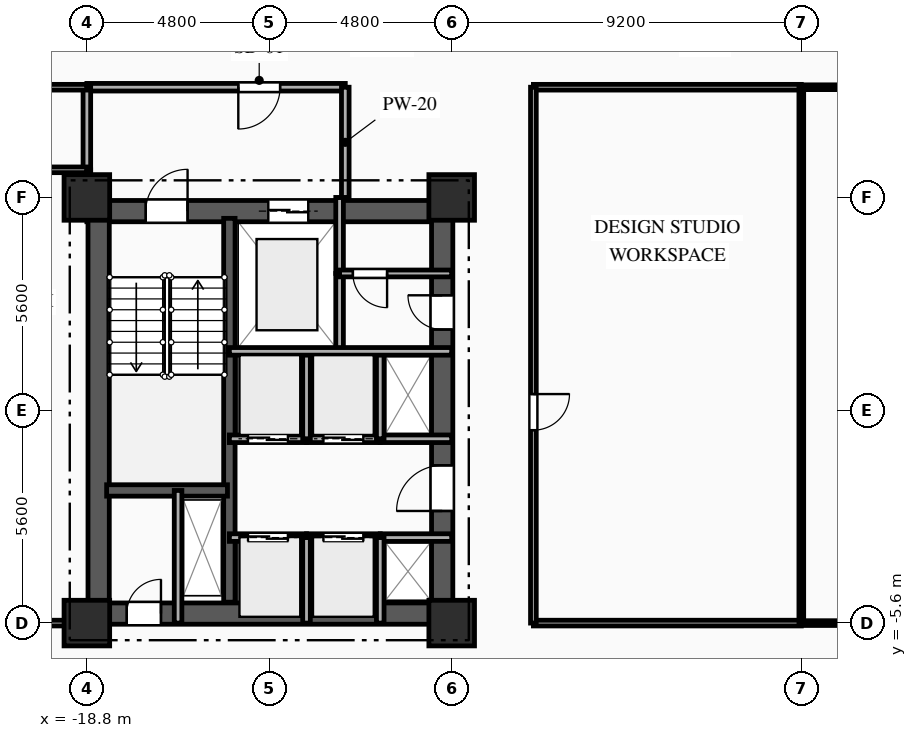
"""IFC4 building model, lengths in metres.
Left out: names, types, materials, properties, quantities, classifications, styles, units other than length and angle.
Written with IfcOpenShell. Run it as: python <this file> out.ifc"""

import sys

from ifc_helpers import new_model, si_unit, direction, frame, frame_2d, origin, origin_2d, place, context, subcontext, project, spatial, rectangle, extrude, element, fill, save


model = new_model("IFC4")
c1 = context("Model", 3, precision=1e-05, world=origin(), true_north=direction((0.0, 1.0)))
c2 = subcontext(c1, "Body", "Model", "MODEL_VIEW")
j1 = project(units=[si_unit("LENGTHUNIT", "METRE"), si_unit("PLANEANGLEUNIT", "RADIAN")], contexts=[c1])
p1 = place(None, origin())
s1 = spatial("IfcSite", under=j1, at=p1, CompositionType="ELEMENT")
p2 = place(p1, origin())
s2 = spatial("IfcBuilding", under=s1, at=p2, CompositionType="ELEMENT")
p3 = place(p2, frame((0.0, 0.0, 63.85)))
s3 = spatial("IfcBuildingStorey", under=s2, at=p3, CompositionType="ELEMENT", Elevation=63.85)
for number, where, z_axis, x_axis in (
    (1, (-18.8, -5.6, 0.0), (0.0, 0.0, 1.0), (1.0, 0.0, 0.0)),
    (2, (-18.8, 5.6, 0.0), (0.0, 0.0, 1.0), (1.0, 0.0, 0.0)),
    (3, (-9.2, -5.6, 0.0), (0.0, 0.0, 1.0), (1.0, 0.0, 0.0)),
    (4, (-9.2, 5.6, 0.0), (0.0, 0.0, 1.0), (1.0, 0.0, 0.0)),
):
    element("IfcColumn", number, at=place(p3, frame(where, z_axis=z_axis, x_axis=x_axis)), inside=s3, PredefinedType="COLUMN", context=c2, shape_type="SweptSolid", body=[
        extrude(rectangle(XDim=1.2, YDim=1.2, at=origin_2d()), origin(), (0.0, 0.0, 1.0), 3.35),
    ])
p4 = place(p3, frame((-18.8, 5.24, 0.0), z_axis=(0.0, 0.0, 1.0), x_axis=(1.0, 0.0, 0.0)))
e5 = element("IfcWall", 5, at=p4, inside=s3, PredefinedType="SHEAR", context=c2, shape_type="SweptSolid", body=[
    extrude(rectangle(XDim=9.6, YDim=0.56, at=frame_2d((4.8, 0.0))), origin(), (0.0, 0.0, 1.0), 3.035),
])
p5 = place(p4, frame((1.55, 0.0, 0.0)))
e6 = element("IfcOpeningElement", 6, at=p5, cuts=e5, PredefinedType="OPENING", context=c2, shape_type="SweptSolid", body=[
    extrude(rectangle(XDim=1.1, YDim=2.15, at=frame_2d((0.55, 1.075))), frame((0.0, 0.29, 0.0), z_axis=(0.0, -1.0, 0.0), x_axis=(1.0, 0.0, 0.0)), (0.0, 0.0, 1.0), 0.58),
])
p6 = place(p4, frame((4.775, 0.0, 0.0)))
e7 = element("IfcOpeningElement", 7, at=p6, cuts=e5, PredefinedType="OPENING", context=c2, shape_type="SweptSolid", body=[
    extrude(rectangle(XDim=1.05, YDim=2.1, at=frame_2d((0.525, 1.05))), frame((0.0, 0.29, 0.0), z_axis=(0.0, -1.0, 0.0), x_axis=(1.0, 0.0, 0.0)), (0.0, 0.0, 1.0), 0.58),
])
p7 = place(p3, frame((-18.8, -5.35, 0.0), z_axis=(0.0, 0.0, 1.0), x_axis=(1.0, 0.0, 0.0)))
e8 = element("IfcWall", 8, at=p7, inside=s3, PredefinedType="SHEAR", context=c2, shape_type="SweptSolid", body=[
    extrude(rectangle(XDim=9.6, YDim=0.56, at=frame_2d((4.8, 0.0))), origin(), (0.0, 0.0, 1.0), 3.035),
])
p8 = place(p7, frame((1.05, 0.0, 0.0)))
e9 = element("IfcOpeningElement", 9, at=p8, cuts=e8, PredefinedType="OPENING", context=c2, shape_type="SweptSolid", body=[
    extrude(rectangle(XDim=0.9, YDim=2.1, at=frame_2d((0.45, 1.05))), frame((0.0, 0.29, 0.0), z_axis=(0.0, -1.0, 0.0), x_axis=(1.0, 0.0, 0.0)), (0.0, 0.0, 1.0), 0.58),
])
p9 = place(p3, frame((-18.49, -5.05, 0.0), z_axis=(0.0, 0.0, 1.0), x_axis=(0.0, 1.0, 0.0)))
e10 = element("IfcWall", 10, at=p9, inside=s3, PredefinedType="SHEAR", context=c2, shape_type="SweptSolid", body=[
    extrude(rectangle(XDim=10.1, YDim=0.56, at=frame_2d((5.05, 0.0))), origin(), (0.0, 0.0, 1.0), 3.035),
])
p10 = place(p3, frame((-9.45, -5.05, 0.0), z_axis=(0.0, 0.0, 1.0), x_axis=(0.0, 1.0, 0.0)))
e11 = element("IfcWall", 11, at=p10, inside=s3, PredefinedType="SHEAR", context=c2, shape_type="SweptSolid", body=[
    extrude(rectangle(XDim=10.1, YDim=0.56, at=frame_2d((5.05, 0.0))), origin(), (0.0, 0.0, 1.0), 3.035),
])
p11 = place(p10, frame((7.175, 0.0, 0.0)))
e12 = element("IfcOpeningElement", 12, at=p11, cuts=e11, PredefinedType="OPENING", context=c2, shape_type="SweptSolid", body=[
    extrude(rectangle(XDim=0.9, YDim=2.1, at=frame_2d((0.45, 1.05))), frame((0.0, 0.29, 0.0), z_axis=(0.0, -1.0, 0.0), x_axis=(1.0, 0.0, 0.0)), (0.0, 0.0, 1.0), 0.58),
])
p12 = place(p10, frame((2.4, 0.0, 0.0)))
e13 = element("IfcOpeningElement", 13, at=p12, cuts=e11, PredefinedType="OPENING", context=c2, shape_type="SweptSolid", body=[
    extrude(rectangle(XDim=1.2, YDim=2.15, at=frame_2d((0.6, 1.075))), frame((0.0, 0.29, 0.0), z_axis=(0.0, -1.0, 0.0), x_axis=(1.0, 0.0, 0.0)), (0.0, 0.0, 1.0), 0.58),
])
p13 = place(p3, frame((-15.05, -5.05, 0.0), z_axis=(0.0, 0.0, 1.0), x_axis=(0.0, 1.0, 0.0)))
e14 = element("IfcWall", 14, at=p13, inside=s3, PredefinedType="SHEAR", context=c2, shape_type="SweptSolid", body=[
    extrude(rectangle(XDim=10.1, YDim=0.3, at=frame_2d((5.05, 0.0))), origin(), (0.0, 0.0, 1.0), 3.035),
])
p14 = place(p3, frame((-18.28, -2.11, 0.0), z_axis=(0.0, 0.0, 1.0), x_axis=(1.0, 0.0, 0.0)))
e15 = element("IfcWall", 15, at=p14, inside=s3, PredefinedType="SHEAR", context=c2, shape_type="SweptSolid", body=[
    extrude(rectangle(XDim=3.18, YDim=0.3, at=frame_2d((1.59, 0.0))), origin(), (0.0, 0.0, 1.0), 3.035),
])
p15 = place(p3, frame((-16.4, -5.6, 0.0), z_axis=(0.0, 0.0, 1.0), x_axis=(0.0, 1.0, 0.0)))
e16 = element("IfcWall", 16, at=p15, inside=s3, PredefinedType="PARTITIONING", context=c2, shape_type="SweptSolid", body=[
    extrude(rectangle(XDim=3.49, YDim=0.2, at=frame_2d((1.745, 0.0))), origin(), (0.0, 0.0, 1.0), 3.035),
])
p16 = place(p3, frame((-12.15, 1.55, 0.0), z_axis=(0.0, 0.0, 1.0), x_axis=(0.0, 1.0, 0.0)))
e17 = element("IfcWall", 17, at=p16, inside=s3, PredefinedType="PARTITIONING", context=c2, shape_type="SweptSolid", body=[
    extrude(rectangle(XDim=2.05, YDim=0.2, at=frame_2d((1.025, 0.0))), origin(), (0.0, 0.0, 1.0), 3.035),
])
p17 = place(p3, frame((-12.15, 3.6, 0.0), z_axis=(0.0, 0.0, 1.0), x_axis=(0.0, 1.0, 0.0)))
e18 = element("IfcWall", 18, at=p17, inside=s3, PredefinedType="PARTITIONING", context=c2, shape_type="SweptSolid", body=[
    extrude(rectangle(XDim=2.0, YDim=0.2, at=frame_2d((1.0, 0.0))), origin(), (0.0, 0.0, 1.0), 3.035),
])
p18 = place(p3, frame((-12.0, 8.5, 0.0), z_axis=(0.0, 0.0, 1.0), x_axis=(-1.0, 0.0, 0.0)))
e19 = element("IfcWall", 19, at=p18, inside=s3, PredefinedType="PARTITIONING", context=c2, shape_type="SweptSolid", body=[
    extrude(rectangle(XDim=6.8, YDim=0.2, at=frame_2d((3.4, 0.0))), origin(), (0.0, 0.0, 1.0), 3.035),
])
p19 = place(p18, frame((1.715, 0.0, 0.0)))
e20 = element("IfcOpeningElement", 20, at=p19, cuts=e19, PredefinedType="OPENING", context=c2, shape_type="SweptSolid", body=[
    extrude(rectangle(XDim=1.1, YDim=2.15, at=frame_2d((0.55, 1.075))), frame((0.0, 0.11, 0.0), z_axis=(0.0, -1.0, 0.0), x_axis=(1.0, 0.0, 0.0)), (0.0, 0.0, 1.0), 0.22),
])
p20 = place(p3, frame((-12.0, 5.6, 0.0), z_axis=(0.0, 0.0, 1.0), x_axis=(0.0, 1.0, 0.0)))
e21 = element("IfcWall", 21, at=p20, inside=s3, PredefinedType="PARTITIONING", context=c2, shape_type="SweptSolid", body=[
    extrude(rectangle(XDim=2.9, YDim=0.2, at=frame_2d((1.45, 0.0))), origin(), (0.0, 0.0, 1.0), 3.035),
])
p21 = place(p3, frame((-18.8, 6.327, 0.0), z_axis=(0.0, 0.0, 1.0), x_axis=(0.0, -1.0, 0.0)))
e22 = element("IfcWall", 22, at=p21, inside=s3, PredefinedType="PARTITIONING", context=c2, shape_type="SweptSolid", body=[
    extrude(rectangle(XDim=0.727, YDim=0.2, at=frame_2d((0.363, 0.0))), origin(), (0.0, 0.0, 1.0), 2.52),
])
p22 = place(p3, frame((-18.8, 8.5, 0.0), z_axis=(0.0, 0.0, 1.0), x_axis=(0.0, -1.0, 0.0)))
e23 = element("IfcWall", 23, at=p22, inside=s3, PredefinedType="PARTITIONING", context=c2, shape_type="SweptSolid", body=[
    extrude(rectangle(XDim=2.173, YDim=0.2, at=frame_2d((1.086, 0.0))), origin(), (0.0, 0.0, 1.0), 2.52),
])
p23 = place(p3, frame((-9.2, 3.6, 0.0), z_axis=(0.0, 0.0, 1.0), x_axis=(-1.0, 0.0, 0.0)))
e24 = element("IfcWall", 24, at=p23, inside=s3, PredefinedType="PARTITIONING", context=c2, shape_type="SweptSolid", body=[
    extrude(rectangle(XDim=2.95, YDim=0.18, at=frame_2d((1.475, 0.0))), origin(), (0.0, 0.0, 1.0), 3.035),
])
p24 = place(p23, frame((1.7, 0.0, 0.0)))
e25 = element("IfcOpeningElement", 25, at=p24, cuts=e24, PredefinedType="OPENING", context=c2, shape_type="SweptSolid", body=[
    extrude(rectangle(XDim=0.9, YDim=2.1, at=frame_2d((0.45, 1.05))), frame((0.0, 0.1, 0.0), z_axis=(0.0, -1.0, 0.0), x_axis=(1.0, 0.0, 0.0)), (0.0, 0.0, 1.0), 0.2),
])
p25 = place(p3, frame((-15.05, -3.35, 0.0), z_axis=(0.0, 0.0, 1.0), x_axis=(1.0, 0.0, 0.0)))
e26 = element("IfcWall", 26, at=p25, inside=s3, PredefinedType="PARTITIONING", context=c2, shape_type="SweptSolid", body=[
    extrude(rectangle(XDim=2.03, YDim=0.2, at=frame_2d((1.015, 0.0))), origin(), (0.0, 0.0, 1.0), 3.035),
])
p26 = place(p25, frame((0.49, 0.0, 0.0)))
e27 = element("IfcOpeningElement", 27, at=p26, cuts=e26, PredefinedType="OPENING", context=c2, shape_type="SweptSolid", body=[
    extrude(rectangle(XDim=1.05, YDim=2.1, at=frame_2d((0.525, 1.05))), frame((0.0, 0.11, 0.0), z_axis=(0.0, -1.0, 0.0), x_axis=(1.0, 0.0, 0.0)), (0.0, 0.0, 1.0), 0.22),
])
p27 = place(p3, frame((-13.02, -3.35, 0.0), z_axis=(0.0, 0.0, 1.0), x_axis=(1.0, 0.0, 0.0)))
e28 = element("IfcWall", 28, at=p27, inside=s3, PredefinedType="PARTITIONING", context=c2, shape_type="SweptSolid", body=[
    extrude(rectangle(XDim=1.94, YDim=0.2, at=frame_2d((0.97, 0.0))), origin(), (0.0, 0.0, 1.0), 3.035),
])
p28 = place(p27, frame((0.445, 0.0, 0.0)))
e29 = element("IfcOpeningElement", 29, at=p28, cuts=e28, PredefinedType="OPENING", context=c2, shape_type="SweptSolid", body=[
    extrude(rectangle(XDim=1.05, YDim=2.1, at=frame_2d((0.525, 1.05))), frame((0.0, 0.11, 0.0), z_axis=(0.0, -1.0, 0.0), x_axis=(1.0, 0.0, 0.0)), (0.0, 0.0, 1.0), 0.22),
])
p29 = place(p3, frame((-11.08, -3.35, 0.0), z_axis=(0.0, 0.0, 1.0), x_axis=(1.0, 0.0, 0.0)))
e30 = element("IfcWall", 30, at=p29, inside=s3, PredefinedType="PARTITIONING", context=c2, shape_type="SweptSolid", body=[
    extrude(rectangle(XDim=1.88, YDim=0.2, at=frame_2d((0.94, 0.0))), origin(), (0.0, 0.0, 1.0), 2.75),
])
p30 = place(p3, frame((-13.02, -0.75, 0.0), z_axis=(0.0, 0.0, 1.0), x_axis=(-1.0, 0.0, 0.0)))
e31 = element("IfcWall", 31, at=p30, inside=s3, PredefinedType="PARTITIONING", context=c2, shape_type="SweptSolid", body=[
    extrude(rectangle(XDim=2.03, YDim=0.2, at=frame_2d((1.015, 0.0))), origin(), (0.0, 0.0, 1.0), 3.035),
])
p31 = place(p30, frame((0.49, 0.0, 0.0)))
e32 = element("IfcOpeningElement", 32, at=p31, cuts=e31, PredefinedType="OPENING", context=c2, shape_type="SweptSolid", body=[
    extrude(rectangle(XDim=1.05, YDim=2.1, at=frame_2d((0.525, 1.05))), frame((0.0, 0.11, 0.0), z_axis=(0.0, -1.0, 0.0), x_axis=(1.0, 0.0, 0.0)), (0.0, 0.0, 1.0), 0.22),
])
p32 = place(p3, frame((-11.08, -0.75, 0.0), z_axis=(0.0, 0.0, 1.0), x_axis=(-1.0, 0.0, 0.0)))
e33 = element("IfcWall", 33, at=p32, inside=s3, PredefinedType="PARTITIONING", context=c2, shape_type="SweptSolid", body=[
    extrude(rectangle(XDim=1.94, YDim=0.2, at=frame_2d((0.97, 0.0))), origin(), (0.0, 0.0, 1.0), 3.035),
])
p33 = place(p32, frame((0.445, 0.0, 0.0)))
e34 = element("IfcOpeningElement", 34, at=p33, cuts=e33, PredefinedType="OPENING", context=c2, shape_type="SweptSolid", body=[
    extrude(rectangle(XDim=1.05, YDim=2.1, at=frame_2d((0.525, 1.05))), frame((0.0, 0.11, 0.0), z_axis=(0.0, -1.0, 0.0), x_axis=(1.0, 0.0, 0.0)), (0.0, 0.0, 1.0), 0.22),
])
p34 = place(p3, frame((-9.2, -0.75, 0.0), z_axis=(0.0, 0.0, 1.0), x_axis=(-1.0, 0.0, 0.0)))
e35 = element("IfcWall", 35, at=p34, inside=s3, PredefinedType="PARTITIONING", context=c2, shape_type="SweptSolid", body=[
    extrude(rectangle(XDim=1.88, YDim=0.2, at=frame_2d((0.94, 0.0))), origin(), (0.0, 0.0, 1.0), 3.035),
])
for number, where, z_axis, x_axis in (
    (36, (-13.02, -5.6, 0.0), (0.0, 0.0, 1.0), (0.0, 1.0, 0.0)),
    (37, (-11.08, -5.6, 0.0), (0.0, 0.0, 1.0), (0.0, 1.0, 0.0)),
):
    element("IfcWall", number, at=place(p3, frame(where, z_axis=z_axis, x_axis=x_axis)), inside=s3, PredefinedType="PARTITIONING", context=c2, shape_type="SweptSolid", body=[
        extrude(rectangle(XDim=2.25, YDim=0.2, at=frame_2d((1.125, 0.0))), origin(), (0.0, 0.0, 1.0), 3.035),
    ])
for number, where, z_axis, x_axis in (
    (38, (-13.02, -0.75, 0.0), (0.0, 0.0, 1.0), (0.0, 1.0, 0.0)),
    (39, (-11.08, -0.75, 0.0), (0.0, 0.0, 1.0), (0.0, 1.0, 0.0)),
):
    element("IfcWall", number, at=place(p3, frame(where, z_axis=z_axis, x_axis=x_axis)), inside=s3, PredefinedType="PARTITIONING", context=c2, shape_type="SweptSolid", body=[
        extrude(rectangle(XDim=2.3, YDim=0.2, at=frame_2d((1.15, 0.0))), origin(), (0.0, 0.0, 1.0), 3.035),
    ])
p35 = place(p3, frame((-18.8, 8.5, 0.0), z_axis=(0.0, 0.0, 1.0), x_axis=(-1.0, 0.0, 0.0)))
e40 = element("IfcWall", 40, at=p35, inside=s3, PredefinedType="PARTITIONING", context=c2, shape_type="SweptSolid", body=[
    extrude(rectangle(XDim=4.2, YDim=0.15, at=frame_2d((2.1, 0.0))), origin(), (0.0, 0.0, 1.0), 3.035),
])
p36 = place(p35, frame((2.321, 0.0, 0.0)))
e41 = element("IfcOpeningElement", 41, at=p36, cuts=e40, PredefinedType="OPENING", context=c2, shape_type="SweptSolid", body=[
    extrude(rectangle(XDim=1.05, YDim=2.15, at=frame_2d((0.525, 1.075))), frame((0.0, 0.085, 0.0), z_axis=(0.0, -1.0, 0.0), x_axis=(1.0, 0.0, 0.0)), (0.0, 0.0, 1.0), 0.17),
])
p37 = place(p3, frame((0.0, 8.5, 0.0), z_axis=(0.0, 0.0, 1.0), x_axis=(-1.0, 0.0, 0.0)))
e42 = element("IfcWall", 42, at=p37, inside=s3, PredefinedType="PARTITIONING", context=c2, shape_type="SweptSolid", body=[
    extrude(rectangle(XDim=7.05, YDim=0.15, at=frame_2d((3.525, 0.0))), origin(), (0.0, 0.0, 1.0), 3.035),
])
p38 = place(p3, frame((7.05, 8.5, 0.0), z_axis=(0.0, 0.0, 1.0), x_axis=(-1.0, 0.0, 0.0)))
e43 = element("IfcWall", 43, at=p38, inside=s3, PredefinedType="PARTITIONING", context=c2, shape_type="SweptSolid", body=[
    extrude(rectangle(XDim=7.05, YDim=0.125, at=frame_2d((3.525, 0.0))), origin(), (0.0, 0.0, 1.0), 3.035),
])
p39 = place(p3, frame((-23.0, -5.6, 0.0), z_axis=(0.0, 0.0, 1.0), x_axis=(1.0, 0.0, 0.0)))
e44 = element("IfcWall", 44, at=p39, inside=s3, PredefinedType="PARTITIONING", context=c2, shape_type="SweptSolid", body=[
    extrude(rectangle(XDim=4.2, YDim=0.15, at=frame_2d((2.1, 0.0))), origin(), (0.0, 0.0, 1.0), 3.035),
])
p40 = place(p39, frame((0.829, 0.0, 0.0)))
e45 = element("IfcOpeningElement", 45, at=p40, cuts=e44, PredefinedType="OPENING", context=c2, shape_type="SweptSolid", body=[
    extrude(rectangle(XDim=1.05, YDim=2.15, at=frame_2d((0.525, 1.075))), frame((0.0, 0.085, 0.0), z_axis=(0.0, -1.0, 0.0), x_axis=(1.0, 0.0, 0.0)), (0.0, 0.0, 1.0), 0.17),
])
p41 = place(p3, frame((-7.05, -5.6, 0.0), z_axis=(0.0, 0.0, 1.0), x_axis=(1.0, 0.0, 0.0)))
e46 = element("IfcWall", 46, at=p41, inside=s3, PredefinedType="PARTITIONING", context=c2, shape_type="SweptSolid", body=[
    extrude(rectangle(XDim=7.05, YDim=0.15, at=frame_2d((3.525, 0.0))), origin(), (0.0, 0.0, 1.0), 2.52),
])
p42 = place(p3, frame((0.0, -5.6, 0.0), z_axis=(0.0, 0.0, 1.0), x_axis=(1.0, 0.0, 0.0)))
e47 = element("IfcWall", 47, at=p42, inside=s3, PredefinedType="PARTITIONING", context=c2, shape_type="SweptSolid", body=[
    extrude(rectangle(XDim=7.05, YDim=0.125, at=frame_2d((3.525, 0.0))), origin(), (0.0, 0.0, 1.0), 2.52),
])
p43 = place(p3, frame((-7.05, 8.5, 0.0), z_axis=(0.0, 0.0, 1.0), x_axis=(0.0, -1.0, 0.0)))
e48 = element("IfcWall", 48, at=p43, inside=s3, PredefinedType="PARTITIONING", context=c2, shape_type="SweptSolid", body=[
    extrude(rectangle(XDim=14.1, YDim=0.15, at=frame_2d((7.05, 0.0))), origin(), (0.0, 0.0, 1.0), 3.035),
])
p44 = place(p43, frame((8.074, 0.0, 0.0)))
e49 = element("IfcOpeningElement", 49, at=p44, cuts=e48, PredefinedType="OPENING", context=c2, shape_type="SweptSolid", body=[
    extrude(rectangle(XDim=0.95, YDim=2.1, at=frame_2d((0.475, 1.05))), frame((0.0, 0.085, 0.0), z_axis=(0.0, -1.0, 0.0), x_axis=(1.0, 0.0, 0.0)), (0.0, 0.0, 1.0), 0.17),
])
p45 = place(p3, frame((-25.59, 6.327, 0.0), z_axis=(0.0, 0.0, 1.0), x_axis=(1.0, 0.0, 0.0)))
e50 = element("IfcWall", 50, at=p45, inside=s3, PredefinedType="PARTITIONING", context=c2, shape_type="SweptSolid", body=[
    extrude(rectangle(XDim=6.79, YDim=0.15, at=frame_2d((3.395, 0.0))), origin(), (0.0, 0.0, 1.0), 3.035),
])
p46 = place(p3, frame((0.0, 8.5, 0.0), z_axis=(0.0, 0.0, 1.0), x_axis=(0.0, -1.0, 0.0)))
e51 = element("IfcWall", 51, at=p46, inside=s3, PredefinedType="PARTITIONING", context=c2, shape_type="SweptSolid", body=[
    extrude(rectangle(XDim=14.1, YDim=0.125, at=frame_2d((7.05, 0.0))), origin(), (0.0, 0.0, 1.0), 3.035),
])
p47 = place(p3, frame((-15.05, 1.55, 0.0), z_axis=(0.0, 0.0, 1.0), x_axis=(1.0, 0.0, 0.0)))
e52 = element("IfcWall", 52, at=p47, inside=s3, PredefinedType="PARTITIONING", context=c2, shape_type="SweptSolid", body=[
    extrude(rectangle(XDim=5.85, YDim=0.2, at=frame_2d((2.925, 0.0))), origin(), (0.0, 0.0, 1.0), 3.035),
])
p48 = place(p5, origin())
e53 = element("IfcDoor", 53, at=p48, inside=s3, OperationType="SINGLE_SWING_RIGHT", PredefinedType="DOOR", context=c2, shape_type="SweptSolid", body=[
    extrude(rectangle(XDim=1.1, YDim=2.15, at=frame_2d((0.55, 1.075))), frame((0.0, 0.025, 0.0), z_axis=(0.0, -1.0, 0.0), x_axis=(1.0, 0.0, 0.0)), (0.0, 0.0, 1.0), 0.05),
])
fill(e6, e53)
p49 = place(p6, origin())
e54 = element("IfcDoor", 54, at=p49, inside=s3, OperationType="DOUBLE_DOOR_SLIDING", PredefinedType="DOOR", context=c2, shape_type="SweptSolid", body=[
    extrude(rectangle(XDim=1.05, YDim=2.1, at=frame_2d((0.525, 1.05))), frame((0.0, 0.025, 0.0), z_axis=(0.0, -1.0, 0.0), x_axis=(1.0, 0.0, 0.0)), (0.0, 0.0, 1.0), 0.05),
])
fill(e7, e54)
p50 = place(p8, origin())
e55 = element("IfcDoor", 55, at=p50, inside=s3, OperationType="SINGLE_SWING_RIGHT", PredefinedType="DOOR", context=c2, shape_type="SweptSolid", body=[
    extrude(rectangle(XDim=0.9, YDim=2.1, at=frame_2d((0.45, 1.05))), frame((0.0, 0.025, 0.0), z_axis=(0.0, -1.0, 0.0), x_axis=(1.0, 0.0, 0.0)), (0.0, 0.0, 1.0), 0.05),
])
fill(e9, e55)
p51 = place(p19, origin())
e56 = element("IfcDoor", 56, at=p51, inside=s3, OperationType="SINGLE_SWING_RIGHT", PredefinedType="DOOR", context=c2, shape_type="SweptSolid", body=[
    extrude(rectangle(XDim=1.1, YDim=2.15, at=frame_2d((0.55, 1.075))), frame((0.0, 0.025, 0.0), z_axis=(0.0, -1.0, 0.0), x_axis=(1.0, 0.0, 0.0)), (0.0, 0.0, 1.0), 0.05),
])
fill(e20, e56)
p52 = place(p24, origin())
e57 = element("IfcDoor", 57, at=p52, inside=s3, OperationType="SINGLE_SWING_LEFT", PredefinedType="DOOR", context=c2, shape_type="SweptSolid", body=[
    extrude(rectangle(XDim=0.9, YDim=2.1, at=frame_2d((0.45, 1.05))), frame((0.0, 0.025, 0.0), z_axis=(0.0, -1.0, 0.0), x_axis=(1.0, 0.0, 0.0)), (0.0, 0.0, 1.0), 0.05),
])
fill(e25, e57)
p53 = place(p11, origin())
e58 = element("IfcDoor", 58, at=p53, inside=s3, OperationType="SINGLE_SWING_RIGHT", PredefinedType="DOOR", context=c2, shape_type="SweptSolid", body=[
    extrude(rectangle(XDim=0.9, YDim=2.1, at=frame_2d((0.45, 1.05))), frame((0.0, 0.025, 0.0), z_axis=(0.0, -1.0, 0.0), x_axis=(1.0, 0.0, 0.0)), (0.0, 0.0, 1.0), 0.05),
])
fill(e12, e58)
p54 = place(p26, origin())
e59 = element("IfcDoor", 59, at=p54, inside=s3, OperationType="DOUBLE_DOOR_SLIDING", PredefinedType="DOOR", context=c2, shape_type="SweptSolid", body=[
    extrude(rectangle(XDim=1.05, YDim=2.1, at=frame_2d((0.525, 1.05))), frame((0.0, 0.025, 0.0), z_axis=(0.0, -1.0, 0.0), x_axis=(1.0, 0.0, 0.0)), (0.0, 0.0, 1.0), 0.05),
])
fill(e27, e59)
p55 = place(p28, origin())
e60 = element("IfcDoor", 60, at=p55, inside=s3, OperationType="DOUBLE_DOOR_SLIDING", PredefinedType="DOOR", context=c2, shape_type="SweptSolid", body=[
    extrude(rectangle(XDim=1.05, YDim=2.1, at=frame_2d((0.525, 1.05))), frame((0.0, 0.025, 0.0), z_axis=(0.0, -1.0, 0.0), x_axis=(1.0, 0.0, 0.0)), (0.0, 0.0, 1.0), 0.05),
])
fill(e29, e60)
p56 = place(p31, origin())
e61 = element("IfcDoor", 61, at=p56, inside=s3, OperationType="DOUBLE_DOOR_SLIDING", PredefinedType="DOOR", context=c2, shape_type="SweptSolid", body=[
    extrude(rectangle(XDim=1.05, YDim=2.1, at=frame_2d((0.525, 1.05))), frame((0.0, 0.025, 0.0), z_axis=(0.0, -1.0, 0.0), x_axis=(1.0, 0.0, 0.0)), (0.0, 0.0, 1.0), 0.05),
])
fill(e32, e61)
p57 = place(p33, origin())
e62 = element("IfcDoor", 62, at=p57, inside=s3, OperationType="DOUBLE_DOOR_SLIDING", PredefinedType="DOOR", context=c2, shape_type="SweptSolid", body=[
    extrude(rectangle(XDim=1.05, YDim=2.1, at=frame_2d((0.525, 1.05))), frame((0.0, 0.025, 0.0), z_axis=(0.0, -1.0, 0.0), x_axis=(1.0, 0.0, 0.0)), (0.0, 0.0, 1.0), 0.05),
])
fill(e34, e62)
p58 = place(p12, origin())
e63 = element("IfcDoor", 63, at=p58, inside=s3, OperationType="SINGLE_SWING_LEFT", PredefinedType="DOOR", context=c2, shape_type="SweptSolid", body=[
    extrude(rectangle(XDim=1.2, YDim=2.15, at=frame_2d((0.6, 1.075))), frame((0.0, 0.025, 0.0), z_axis=(0.0, -1.0, 0.0), x_axis=(1.0, 0.0, 0.0)), (0.0, 0.0, 1.0), 0.05),
])
fill(e13, e63)
p59 = place(p44, origin())
e64 = element("IfcDoor", 64, at=p59, inside=s3, OperationType="SINGLE_SWING_LEFT", PredefinedType="DOOR", context=c2, shape_type="SweptSolid", body=[
    extrude(rectangle(XDim=0.95, YDim=2.1, at=frame_2d((0.475, 1.05))), frame((0.0, 0.025, 0.0), z_axis=(0.0, -1.0, 0.0), x_axis=(1.0, 0.0, 0.0)), (0.0, 0.0, 1.0), 0.05),
])
fill(e49, e64)
save(model, sys.argv[1])
